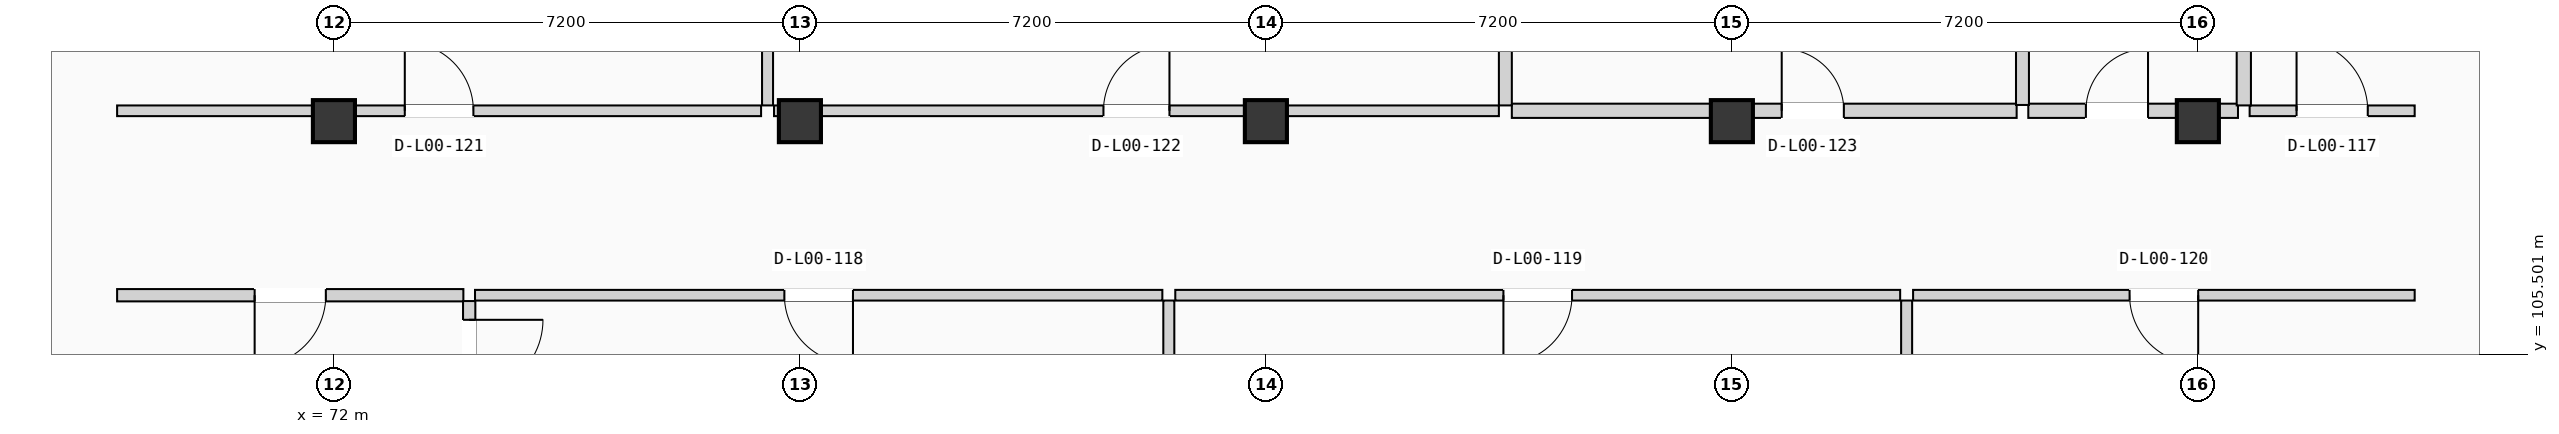
"""IFC4 building model, lengths in metres.
Left out: names, types, materials, properties, quantities, classifications, styles, units other than length and angle.
Written with IfcOpenShell. Run it as: python <this file> out.ifc"""

import sys

from ifc_helpers import new_model, si_unit, direction, frame, frame_2d, origin, origin_2d, place, context, subcontext, project, spatial, rectangle, circle, extrude, element, fill, save


model = new_model("IFC4")
c1 = context("Model", 3, precision=1e-05, world=origin(), true_north=direction((0.0, 1.0)))
c2 = subcontext(c1, "Body", "Model", "MODEL_VIEW")
j1 = project(units=[si_unit("LENGTHUNIT", "METRE"), si_unit("PLANEANGLEUNIT", "RADIAN")], contexts=[c1])
p1 = place(None, origin())
s1 = spatial("IfcSite", under=j1, at=p1, CompositionType="ELEMENT")
p2 = place(p1, origin())
s2 = spatial("IfcBuilding", under=s1, at=p2, CompositionType="ELEMENT")
p3 = place(p2, origin())
s3 = spatial("IfcBuildingStorey", under=s2, at=p3, CompositionType="ELEMENT", Elevation=0.0)
for number, where, z_axis, x_axis in (
    (1, (72.0, 109.1, 0.0), (0.0, 0.0, 1.0), (1.0, 0.0, 0.0)),
    (2, (79.2, 109.1, 0.0), (0.0, 0.0, 1.0), (1.0, 0.0, 0.0)),
    (3, (86.4, 109.1, 0.0), (0.0, 0.0, 1.0), (1.0, 0.0, 0.0)),
    (4, (93.6, 109.1, 0.0), (0.0, 0.0, 1.0), (1.0, 0.0, 0.0)),
    (5, (100.8, 109.1, 0.0), (0.0, 0.0, 1.0), (1.0, 0.0, 0.0)),
):
    element("IfcColumn", number, at=place(p3, frame(where, z_axis=z_axis, x_axis=x_axis)), inside=s3, PredefinedType="COLUMN", context=c2, shape_type="SweptSolid", body=[
        extrude(circle(Radius=0.325, at=origin_2d()), origin(), (0.0, 0.0, 1.0), 4.9),
    ])
p4 = place(p3, frame((68.65, 106.41, 0.0), z_axis=(0.0, 0.0, 1.0), x_axis=(1.0, 0.0, 0.0)))
e6 = element("IfcWall", 6, at=p4, inside=s3, PredefinedType="PARTITIONING", context=c2, shape_type="SweptSolid", body=[
    extrude(rectangle(XDim=5.35, YDim=0.19, at=frame_2d((2.675, 0.0))), origin(), (0.0, 0.0, 1.0), 3.84),
])
p5 = place(p4, frame((2.125, 0.0, 0.0)))
e7 = element("IfcOpeningElement", 7, at=p5, cuts=e6, PredefinedType="OPENING", context=c2, shape_type="SweptSolid", body=[
    extrude(rectangle(XDim=1.1, YDim=2.12, at=frame_2d((0.55, 1.06))), frame((0.0, 0.105, 0.0), z_axis=(0.0, -1.0, 0.0), x_axis=(1.0, 0.0, 0.0)), (0.0, 0.0, 1.0), 0.21),
])
p6 = place(p3, frame((74.09, 104.6, 0.0), z_axis=(0.0, 0.0, 1.0), x_axis=(0.0, 1.0, 0.0)))
e8 = element("IfcWall", 8, at=p6, inside=s3, PredefinedType="PARTITIONING", context=c2, shape_type="SweptSolid", body=[
    extrude(rectangle(XDim=1.72, YDim=0.19, at=frame_2d((0.86, 0.0))), origin(), (0.0, 0.0, 1.0), 3.84),
])
p7 = place(p6, frame((0.29, 0.0, 0.0)))
e9 = element("IfcOpeningElement", 9, at=p7, cuts=e8, PredefinedType="OPENING", context=c2, shape_type="SweptSolid", body=[
    extrude(rectangle(XDim=1.14, YDim=2.18, at=frame_2d((0.57, 1.09))), frame((0.0, 0.105, 0.0), z_axis=(0.0, -1.0, 0.0), x_axis=(1.0, 0.0, 0.0)), (0.0, 0.0, 1.0), 0.21),
])
p8 = place(p3, frame((101.6, 109.26, 0.0), z_axis=(0.0, 0.0, 1.0), x_axis=(1.0, 0.0, 0.0)))
e10 = element("IfcWall", 10, at=p8, inside=s3, PredefinedType="PARTITIONING", context=c2, shape_type="SweptSolid", body=[
    extrude(rectangle(XDim=2.55, YDim=0.165, at=frame_2d((1.275, 0.0))), origin(), (0.0, 0.0, 1.0), 3.84),
])
p9 = place(p8, frame((0.725, 0.0, 0.0)))
e11 = element("IfcOpeningElement", 11, at=p9, cuts=e10, PredefinedType="OPENING", context=c2, shape_type="SweptSolid", body=[
    extrude(rectangle(XDim=1.1, YDim=2.12, at=frame_2d((0.55, 1.06))), frame((0.0, 0.093, 0.0), z_axis=(0.0, -1.0, 0.0), x_axis=(1.0, 0.0, 0.0)), (0.0, 0.0, 1.0), 0.185),
])
p10 = place(p3, frame((74.18, 106.41, 0.0), z_axis=(0.0, 0.0, 1.0), x_axis=(1.0, 0.0, 0.0)))
e12 = element("IfcWall", 12, at=p10, inside=s3, PredefinedType="PARTITIONING", context=c2, shape_type="SweptSolid", body=[
    extrude(rectangle(XDim=10.62, YDim=0.165, at=frame_2d((5.31, 0.0))), origin(), (0.0, 0.0, 1.0), 3.84),
])
p11 = place(p10, frame((4.78, 0.0, 0.0)))
e13 = element("IfcOpeningElement", 13, at=p11, cuts=e12, PredefinedType="OPENING", context=c2, shape_type="SweptSolid", body=[
    extrude(rectangle(XDim=1.06, YDim=2.14, at=frame_2d((0.53, 1.07))), frame((0.0, 0.093, 0.0), z_axis=(0.0, -1.0, 0.0), x_axis=(1.0, 0.0, 0.0)), (0.0, 0.0, 1.0), 0.185),
])
p12 = place(p3, frame((85.0, 106.41, 0.0), z_axis=(0.0, 0.0, 1.0), x_axis=(1.0, 0.0, 0.0)))
e14 = element("IfcWall", 14, at=p12, inside=s3, PredefinedType="PARTITIONING", context=c2, shape_type="SweptSolid", body=[
    extrude(rectangle(XDim=11.2, YDim=0.165, at=frame_2d((5.6, 0.0))), origin(), (0.0, 0.0, 1.0), 3.84),
])
p13 = place(p12, frame((5.07, 0.0, 0.0)))
e15 = element("IfcOpeningElement", 15, at=p13, cuts=e14, PredefinedType="OPENING", context=c2, shape_type="SweptSolid", body=[
    extrude(rectangle(XDim=1.06, YDim=2.14, at=frame_2d((0.53, 1.07))), frame((0.0, 0.093, 0.0), z_axis=(0.0, -1.0, 0.0), x_axis=(1.0, 0.0, 0.0)), (0.0, 0.0, 1.0), 0.185),
])
p14 = place(p3, frame((96.4, 106.41, 0.0), z_axis=(0.0, 0.0, 1.0), x_axis=(1.0, 0.0, 0.0)))
e16 = element("IfcWall", 16, at=p14, inside=s3, PredefinedType="PARTITIONING", context=c2, shape_type="SweptSolid", body=[
    extrude(rectangle(XDim=7.75, YDim=0.165, at=frame_2d((3.875, 0.0))), origin(), (0.0, 0.0, 1.0), 3.84),
])
p15 = place(p14, frame((3.345, 0.0, 0.0)))
e17 = element("IfcOpeningElement", 17, at=p15, cuts=e16, PredefinedType="OPENING", context=c2, shape_type="SweptSolid", body=[
    extrude(rectangle(XDim=1.06, YDim=2.14, at=frame_2d((0.53, 1.07))), frame((0.0, 0.093, 0.0), z_axis=(0.0, -1.0, 0.0), x_axis=(1.0, 0.0, 0.0)), (0.0, 0.0, 1.0), 0.185),
])
p16 = place(p3, frame((68.65, 109.26, 0.0), z_axis=(0.0, 0.0, 1.0), x_axis=(1.0, 0.0, 0.0)))
e18 = element("IfcWall", 18, at=p16, inside=s3, PredefinedType="PARTITIONING", context=c2, shape_type="SweptSolid", body=[
    extrude(rectangle(XDim=9.95, YDim=0.165, at=frame_2d((4.975, 0.0))), origin(), (0.0, 0.0, 1.0), 3.84),
])
p17 = place(p16, frame((4.445, 0.0, 0.0)))
e19 = element("IfcOpeningElement", 19, at=p17, cuts=e18, PredefinedType="OPENING", context=c2, shape_type="SweptSolid", body=[
    extrude(rectangle(XDim=1.06, YDim=2.14, at=frame_2d((0.53, 1.07))), frame((0.0, 0.093, 0.0), z_axis=(0.0, -1.0, 0.0), x_axis=(1.0, 0.0, 0.0)), (0.0, 0.0, 1.0), 0.185),
])
p18 = place(p3, frame((78.8, 109.26, 0.0), z_axis=(0.0, 0.0, 1.0), x_axis=(1.0, 0.0, 0.0)))
e20 = element("IfcWall", 20, at=p18, inside=s3, PredefinedType="PARTITIONING", context=c2, shape_type="SweptSolid", body=[
    extrude(rectangle(XDim=11.2, YDim=0.165, at=frame_2d((5.6, 0.0))), origin(), (0.0, 0.0, 1.0), 3.84),
])
p19 = place(p18, frame((5.09, 0.0, 0.0)))
e21 = element("IfcOpeningElement", 21, at=p19, cuts=e20, PredefinedType="OPENING", context=c2, shape_type="SweptSolid", body=[
    extrude(rectangle(XDim=1.02, YDim=2.16, at=frame_2d((0.51, 1.08))), frame((0.0, 0.093, 0.0), z_axis=(0.0, -1.0, 0.0), x_axis=(1.0, 0.0, 0.0)), (0.0, 0.0, 1.0), 0.185),
])
p20 = place(p3, frame((90.2, 109.26, 0.0), z_axis=(0.0, 0.0, 1.0), x_axis=(1.0, 0.0, 0.0)))
e22 = element("IfcWall", 22, at=p20, inside=s3, PredefinedType="PLUMBINGWALL", context=c2, shape_type="SweptSolid", body=[
    extrude(rectangle(XDim=7.8, YDim=0.22, at=frame_2d((3.9, 0.0))), origin(), (0.0, 0.0, 1.0), 3.84),
])
p21 = place(p20, frame((4.17, 0.0, 0.0)))
e23 = element("IfcOpeningElement", 23, at=p21, cuts=e22, PredefinedType="OPENING", context=c2, shape_type="SweptSolid", body=[
    extrude(rectangle(XDim=0.96, YDim=2.05, at=frame_2d((0.48, 1.025))), frame((0.0, 0.12, 0.0), z_axis=(0.0, -1.0, 0.0), x_axis=(1.0, 0.0, 0.0)), (0.0, 0.0, 1.0), 0.24),
])
p22 = place(p3, frame((98.18, 109.26, 0.0), z_axis=(0.0, 0.0, 1.0), x_axis=(1.0, 0.0, 0.0)))
e24 = element("IfcWall", 24, at=p22, inside=s3, PredefinedType="PLUMBINGWALL", context=c2, shape_type="SweptSolid", body=[
    extrude(rectangle(XDim=3.24, YDim=0.22, at=frame_2d((1.62, 0.0))), origin(), (0.0, 0.0, 1.0), 3.84),
])
p23 = place(p22, frame((0.89, 0.0, 0.0)))
e25 = element("IfcOpeningElement", 25, at=p23, cuts=e24, PredefinedType="OPENING", context=c2, shape_type="SweptSolid", body=[
    extrude(rectangle(XDim=0.96, YDim=2.05, at=frame_2d((0.48, 1.025))), frame((0.0, 0.12, 0.0), z_axis=(0.0, -1.0, 0.0), x_axis=(1.0, 0.0, 0.0)), (0.0, 0.0, 1.0), 0.24),
])
p24 = place(p3, frame((101.51, 109.343, 0.0), z_axis=(0.0, 0.0, 1.0), x_axis=(0.0, 1.0, 0.0)))
e26 = element("IfcWall", 26, at=p24, inside=s3, PredefinedType="PLUMBINGWALL", context=c2, shape_type="SweptSolid", body=[
    extrude(rectangle(XDim=9.137, YDim=0.22, at=frame_2d((4.568, 0.0))), origin(), (0.0, 0.0, 1.0), 3.84),
])
p25 = place(p24, frame((4.092, 0.0, 0.0)))
e27 = element("IfcOpeningElement", 27, at=p25, cuts=e26, PredefinedType="OPENING", context=c2, shape_type="SweptSolid", body=[
    extrude(rectangle(XDim=0.96, YDim=2.05, at=frame_2d((0.48, 1.025))), frame((0.0, 0.12, 0.0), z_axis=(0.0, -1.0, 0.0), x_axis=(1.0, 0.0, 0.0)), (0.0, 0.0, 1.0), 0.24),
])
for number, where, z_axis, x_axis in (
    (28, (84.9, 97.52, 0.0), (0.0, 0.0, 1.0), (0.0, 1.0, 0.0)),
    (29, (96.3, 97.52, 0.0), (0.0, 0.0, 1.0), (0.0, 1.0, 0.0)),
):
    element("IfcWall", number, at=place(p3, frame(where, z_axis=z_axis, x_axis=x_axis)), inside=s3, PredefinedType="PARTITIONING", context=c2, shape_type="SweptSolid", body=[
        extrude(rectangle(XDim=8.808, YDim=0.17, at=frame_2d((4.404, 0.0))), origin(), (0.0, 0.0, 1.0), 3.84),
    ])
p26 = place(p3, frame((78.7, 109.343, 0.0), z_axis=(0.0, 0.0, 1.0), x_axis=(0.0, 1.0, 0.0)))
e30 = element("IfcWall", 30, at=p26, inside=s3, PredefinedType="PARTITIONING", context=c2, shape_type="SweptSolid", body=[
    extrude(rectangle(XDim=9.137, YDim=0.17, at=frame_2d((4.568, 0.0))), origin(), (0.0, 0.0, 1.0), 3.84),
])
p27 = place(p3, frame((90.1, 109.343, 0.0), z_axis=(0.0, 0.0, 1.0), x_axis=(0.0, 1.0, 0.0)))
e31 = element("IfcWall", 31, at=p27, inside=s3, PredefinedType="PLUMBINGWALL", context=c2, shape_type="SweptSolid", body=[
    extrude(rectangle(XDim=9.137, YDim=0.2, at=frame_2d((4.568, 0.0))), origin(), (0.0, 0.0, 1.0), 3.84),
])
p28 = place(p3, frame((98.09, 109.35, 0.0), z_axis=(0.0, 0.0, 1.0), x_axis=(0.0, 1.0, 0.0)))
e32 = element("IfcWall", 32, at=p28, inside=s3, PredefinedType="PLUMBINGWALL", context=c2, shape_type="SweptSolid", body=[
    extrude(rectangle(XDim=9.13, YDim=0.2, at=frame_2d((4.565, 0.0))), origin(), (0.0, 0.0, 1.0), 3.84),
])
p29 = place(p5, frame((1.1, 0.0, 0.0), z_axis=(0.0, 0.0, 1.0), x_axis=(-1.0, 0.0, 0.0)))
e33 = element("IfcDoor", 33, at=p29, inside=s3, OperationType="SINGLE_SWING_LEFT", PredefinedType="DOOR", context=c2, shape_type="SweptSolid", body=[
    extrude(rectangle(XDim=1.1, YDim=2.12, at=frame_2d((0.55, 1.06))), frame((0.0, 0.025, 0.0), z_axis=(0.0, -1.0, 0.0), x_axis=(1.0, 0.0, 0.0)), (0.0, 0.0, 1.0), 0.05),
])
fill(e7, e33)
p30 = place(p7, frame((1.14, 0.0, 0.0), z_axis=(0.0, 0.0, 1.0), x_axis=(-1.0, 0.0, 0.0)))
e34 = element("IfcDoor", 34, at=p30, inside=s3, OperationType="SINGLE_SWING_RIGHT", PredefinedType="DOOR", context=c2, shape_type="SweptSolid", body=[
    extrude(rectangle(XDim=1.14, YDim=2.18, at=frame_2d((0.57, 1.09))), frame((0.0, 0.025, 0.0), z_axis=(0.0, -1.0, 0.0), x_axis=(1.0, 0.0, 0.0)), (0.0, 0.0, 1.0), 0.05),
])
fill(e9, e34)
p31 = place(p9, origin())
e35 = element("IfcDoor", 35, at=p31, inside=s3, OperationType="SINGLE_SWING_LEFT", PredefinedType="DOOR", context=c2, shape_type="SweptSolid", body=[
    extrude(rectangle(XDim=1.1, YDim=2.12, at=frame_2d((0.55, 1.06))), frame((0.0, 0.025, 0.0), z_axis=(0.0, -1.0, 0.0), x_axis=(1.0, 0.0, 0.0)), (0.0, 0.0, 1.0), 0.05),
])
fill(e11, e35)
p32 = place(p11, frame((1.06, 0.0, 0.0), z_axis=(0.0, 0.0, 1.0), x_axis=(-1.0, 0.0, 0.0)))
e36 = element("IfcDoor", 36, at=p32, inside=s3, OperationType="SINGLE_SWING_RIGHT", PredefinedType="DOOR", context=c2, shape_type="SweptSolid", body=[
    extrude(rectangle(XDim=1.06, YDim=2.14, at=frame_2d((0.53, 1.07))), frame((0.0, 0.025, 0.0), z_axis=(0.0, -1.0, 0.0), x_axis=(1.0, 0.0, 0.0)), (0.0, 0.0, 1.0), 0.05),
])
fill(e13, e36)
p33 = place(p13, frame((1.06, 0.0, 0.0), z_axis=(0.0, 0.0, 1.0), x_axis=(-1.0, 0.0, 0.0)))
e37 = element("IfcDoor", 37, at=p33, inside=s3, OperationType="SINGLE_SWING_LEFT", PredefinedType="DOOR", context=c2, shape_type="SweptSolid", body=[
    extrude(rectangle(XDim=1.06, YDim=2.14, at=frame_2d((0.53, 1.07))), frame((0.0, 0.025, 0.0), z_axis=(0.0, -1.0, 0.0), x_axis=(1.0, 0.0, 0.0)), (0.0, 0.0, 1.0), 0.05),
])
fill(e15, e37)
p34 = place(p15, frame((1.06, 0.0, 0.0), z_axis=(0.0, 0.0, 1.0), x_axis=(-1.0, 0.0, 0.0)))
e38 = element("IfcDoor", 38, at=p34, inside=s3, OperationType="SINGLE_SWING_RIGHT", PredefinedType="DOOR", context=c2, shape_type="SweptSolid", body=[
    extrude(rectangle(XDim=1.06, YDim=2.14, at=frame_2d((0.53, 1.07))), frame((0.0, 0.025, 0.0), z_axis=(0.0, -1.0, 0.0), x_axis=(1.0, 0.0, 0.0)), (0.0, 0.0, 1.0), 0.05),
])
fill(e17, e38)
p35 = place(p17, origin())
e39 = element("IfcDoor", 39, at=p35, inside=s3, OperationType="SINGLE_SWING_LEFT", PredefinedType="DOOR", context=c2, shape_type="SweptSolid", body=[
    extrude(rectangle(XDim=1.06, YDim=2.14, at=frame_2d((0.53, 1.07))), frame((0.0, 0.025, 0.0), z_axis=(0.0, -1.0, 0.0), x_axis=(1.0, 0.0, 0.0)), (0.0, 0.0, 1.0), 0.05),
])
fill(e19, e39)
p36 = place(p19, origin())
e40 = element("IfcDoor", 40, at=p36, inside=s3, OperationType="SINGLE_SWING_RIGHT", PredefinedType="DOOR", context=c2, shape_type="SweptSolid", body=[
    extrude(rectangle(XDim=1.02, YDim=2.16, at=frame_2d((0.51, 1.08))), frame((0.0, 0.025, 0.0), z_axis=(0.0, -1.0, 0.0), x_axis=(1.0, 0.0, 0.0)), (0.0, 0.0, 1.0), 0.05),
])
fill(e21, e40)
p37 = place(p21, origin())
e41 = element("IfcDoor", 41, at=p37, inside=s3, OperationType="SINGLE_SWING_LEFT", PredefinedType="DOOR", context=c2, shape_type="SweptSolid", body=[
    extrude(rectangle(XDim=0.96, YDim=2.05, at=frame_2d((0.48, 1.025))), frame((0.0, 0.025, 0.0), z_axis=(0.0, -1.0, 0.0), x_axis=(1.0, 0.0, 0.0)), (0.0, 0.0, 1.0), 0.05),
])
fill(e23, e41)
p38 = place(p23, origin())
e42 = element("IfcDoor", 42, at=p38, inside=s3, OperationType="SINGLE_SWING_RIGHT", PredefinedType="DOOR", context=c2, shape_type="SweptSolid", body=[
    extrude(rectangle(XDim=0.96, YDim=2.05, at=frame_2d((0.48, 1.025))), frame((0.0, 0.025, 0.0), z_axis=(0.0, -1.0, 0.0), x_axis=(1.0, 0.0, 0.0)), (0.0, 0.0, 1.0), 0.05),
])
fill(e25, e42)
save(model, sys.argv[1])
